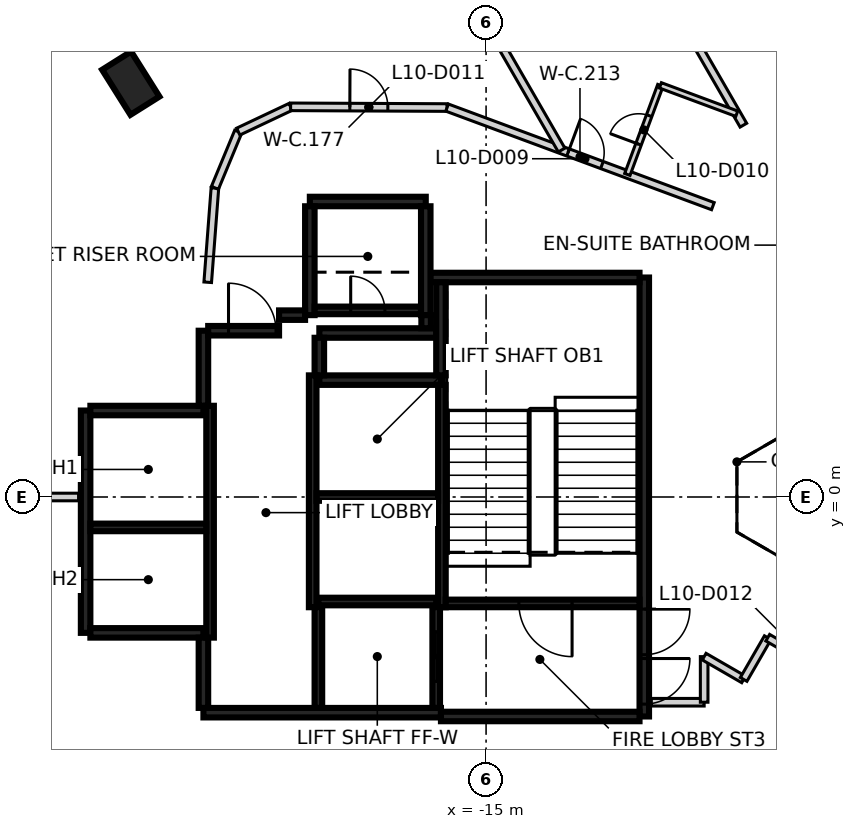
"""IFC4 building model, lengths in metres.
Left out: names, types, materials, properties, quantities, classifications, styles, units other than length and angle.
Written with IfcOpenShell. Run it as: python <this file> out.ifc"""

import sys

from ifc_helpers import new_model, si_unit, direction, frame, frame_2d, origin, origin_2d, place, context, subcontext, project, spatial, rectangle, extrude, element, fill, save


model = new_model("IFC4")
c1 = context("Model", 3, precision=1e-05, world=origin(), true_north=direction((0.0, 1.0)))
c2 = subcontext(c1, "Body", "Model", "MODEL_VIEW")
j1 = project(units=[si_unit("LENGTHUNIT", "METRE"), si_unit("PLANEANGLEUNIT", "RADIAN")], contexts=[c1])
p1 = place(None, origin())
s1 = spatial("IfcSite", under=j1, at=p1, CompositionType="ELEMENT")
p2 = place(p1, origin())
s2 = spatial("IfcBuilding", under=s1, at=p2, CompositionType="ELEMENT")
p3 = place(p2, frame((0.0, 0.0, 49.4)))
s3 = spatial("IfcBuildingStorey", under=s2, at=p3, CompositionType="ELEMENT", Elevation=49.4)
p4 = place(p3, frame((-24.349, 10.888, -0.475), z_axis=(0.0, 0.0, 1.0), x_axis=(-0.532388815436, 0.84649994046, 0.0)))
e1 = element("IfcColumn", 1, at=p4, inside=s3, PredefinedType="COLUMN", context=c2, shape_type="SweptSolid", body=[
    extrude(rectangle(XDim=1.4, YDim=0.9, at=origin_2d()), origin(), (0.0, 0.0, 1.0), 3.6),
])
p5 = place(p3, frame((-10.837, 5.775, 0.0), z_axis=(0.0, 0.0, 1.0), x_axis=(0.0, -1.0, 0.0)))
e2 = element("IfcWall", 2, at=p5, inside=s3, PredefinedType="SHEAR", context=c2, shape_type="SweptSolid", body=[
    extrude(rectangle(XDim=11.55, YDim=0.25, at=frame_2d((5.775, 0.0))), origin(), (0.0, 0.0, 1.0), 3.125),
])
p6 = place(p5, frame((10.025, 0.0, 0.0)))
e3 = element("IfcOpeningElement", 3, at=p6, cuts=e2, PredefinedType="OPENING", context=c2, shape_type="SweptSolid", body=[
    extrude(rectangle(XDim=1.2, YDim=2.1, at=frame_2d((0.6, 1.05))), frame((0.0, 0.135, 0.0), z_axis=(0.0, -1.0, 0.0), x_axis=(1.0, 0.0, 0.0)), (0.0, 0.0, 1.0), 0.27),
])
p7 = place(p5, frame((8.725, 0.0, 0.0)))
e4 = element("IfcOpeningElement", 4, at=p7, cuts=e2, PredefinedType="OPENING", context=c2, shape_type="SweptSolid", body=[
    extrude(rectangle(XDim=1.2, YDim=2.1, at=frame_2d((0.6, 1.05))), frame((0.0, 0.135, 0.0), z_axis=(0.0, -1.0, 0.0), x_axis=(1.0, 0.0, 0.0)), (0.0, 0.0, 1.0), 0.27),
])
p8 = place(p3, frame((-16.187, -5.675, 0.0), z_axis=(0.0, 0.0, 1.0), x_axis=(-1.0, 0.0, 0.0)))
e5 = element("IfcWall", 5, at=p8, inside=s3, PredefinedType="SHEAR", context=c2, shape_type="SweptSolid", body=[
    extrude(rectangle(XDim=6.25, YDim=0.25, at=frame_2d((3.125, 0.0))), origin(), (0.0, 0.0, 1.0), 3.125),
])
p9 = place(p3, frame((-25.537, -3.575, 0.0), z_axis=(0.0, 0.0, 1.0), x_axis=(0.0, 1.0, 0.0)))
e6 = element("IfcWall", 6, at=p9, inside=s3, PredefinedType="SHEAR", context=c2, shape_type="SweptSolid", body=[
    extrude(rectangle(XDim=5.85, YDim=0.25, at=frame_2d((2.925, 0.0))), origin(), (0.0, 0.0, 1.0), 3.125),
])
p10 = place(p3, frame((-10.963, -5.775, 0.0), z_axis=(0.0, 0.0, 1.0), x_axis=(-1.0, 0.0, 0.0)))
e7 = element("IfcWall", 7, at=p10, inside=s3, PredefinedType="SHEAR", context=c2, shape_type="SweptSolid", body=[
    extrude(rectangle(XDim=5.225, YDim=0.25, at=frame_2d((2.612, 0.0))), origin(), (0.0, 0.0, 1.0), 3.125),
])
p11 = place(p3, frame((-16.472, 5.775, 0.0), z_axis=(0.0, 0.0, 1.0), x_axis=(1.0, 0.0, 0.0)))
e8 = element("IfcWall", 8, at=p11, inside=s3, PredefinedType="SHEAR", context=c2, shape_type="SweptSolid", body=[
    extrude(rectangle(XDim=5.51, YDim=0.25, at=frame_2d((2.755, 0.0))), origin(), (0.0, 0.0, 1.0), 3.125),
])
p12 = place(p3, frame((-19.387, 3.075, 0.0), z_axis=(0.0, 0.0, 1.0), x_axis=(1.0, 0.0, 0.0)))
e9 = element("IfcWall", 9, at=p12, inside=s3, PredefinedType="SHEAR", context=c2, shape_type="SweptSolid", body=[
    extrude(rectangle(XDim=3.2, YDim=0.25, at=frame_2d((1.6, 0.0))), origin(), (0.0, 0.0, 1.0), 3.125),
])
for number, where, z_axis, x_axis in (
    (10, (-22.437, -3.575, 0.0), (0.0, 0.0, 1.0), (-1.0, 0.0, 0.0)),
    (11, (-25.412, 2.275, 0.0), (0.0, 0.0, 1.0), (1.0, 0.0, 0.0)),
):
    element("IfcWall", number, at=place(p3, frame(where, z_axis=z_axis, x_axis=x_axis)), inside=s3, PredefinedType="SHEAR", context=c2, shape_type="SweptSolid", body=[
        extrude(rectangle(XDim=2.975, YDim=0.25, at=frame_2d((1.487, 0.0))), origin(), (0.0, 0.0, 1.0), 3.125),
    ])
p13 = place(p3, frame((-19.637, 7.775, 0.0), z_axis=(0.0, 0.0, 1.0), x_axis=(1.0, 0.0, 0.0)))
e12 = element("IfcWall", 12, at=p13, inside=s3, PredefinedType="SHEAR", context=c2, shape_type="SweptSolid", body=[
    extrude(rectangle(XDim=3.05, YDim=0.25, at=frame_2d((1.525, 0.0))), origin(), (0.0, 0.0, 1.0), 3.125),
])
for number, where, z_axis, x_axis in (
    (13, (-16.587, 7.65, 0.0), (0.0, 0.0, 1.0), (0.0, -1.0, 0.0)),
    (14, (-19.637, 4.785, 0.0), (0.0, 0.0, 1.0), (0.0, 1.0, 0.0)),
):
    element("IfcWall", number, at=place(p3, frame(where, z_axis=z_axis, x_axis=x_axis)), inside=s3, PredefinedType="SHEAR", context=c2, shape_type="SweptSolid", body=[
        extrude(rectangle(XDim=2.865, YDim=0.25, at=frame_2d((1.432, 0.0))), origin(), (0.0, 0.0, 1.0), 3.125),
    ])
p14 = place(p3, frame((-16.302, 4.315, 0.0), z_axis=(0.0, 0.0, 1.0), x_axis=(-1.0, 0.0, 0.0)))
e15 = element("IfcWall", 15, at=p14, inside=s3, PredefinedType="SHEAR", context=c2, shape_type="SweptSolid", body=[
    extrude(rectangle(XDim=3.085, YDim=0.25, at=frame_2d((1.542, 0.0))), origin(), (0.0, 0.0, 1.0), 3.125),
])
p15 = place(p3, frame((-16.187, 3.2, 0.0), z_axis=(0.0, 0.0, 1.0), x_axis=(0.0, 1.0, 0.0)))
e16 = element("IfcWall", 16, at=p15, inside=s3, PredefinedType="SHEAR", context=c2, shape_type="SweptSolid", body=[
    extrude(rectangle(XDim=2.449, YDim=0.25, at=frame_2d((1.225, 0.0))), origin(), (0.0, 0.0, 1.0), 3.125),
])
p16 = place(p3, frame((-22.437, 2.4, 0.0), z_axis=(0.0, 0.0, 1.0), x_axis=(0.0, 1.0, 0.0)))
e17 = element("IfcWall", 17, at=p16, inside=s3, PredefinedType="SHEAR", context=c2, shape_type="SweptSolid", body=[
    extrude(rectangle(XDim=1.975, YDim=0.25, at=frame_2d((0.987, 0.0))), origin(), (0.0, 0.0, 1.0), 3.125),
])
p17 = place(p3, frame((-22.437, -5.55, 0.0), z_axis=(0.0, 0.0, 1.0), x_axis=(0.0, 1.0, 0.0)))
e18 = element("IfcWall", 18, at=p17, inside=s3, PredefinedType="SHEAR", context=c2, shape_type="SweptSolid", body=[
    extrude(rectangle(XDim=1.849, YDim=0.25, at=frame_2d((0.925, 0.0))), origin(), (0.0, 0.0, 1.0), 3.125),
])
p18 = place(p3, frame((-22.312, 4.375, 0.0), z_axis=(0.0, 0.0, 1.0), x_axis=(1.0, 0.0, 0.0)))
e19 = element("IfcWall", 19, at=p18, inside=s3, PredefinedType="SHEAR", context=c2, shape_type="SweptSolid", body=[
    extrude(rectangle(XDim=1.865, YDim=0.25, at=frame_2d((0.932, 0.0))), origin(), (0.0, 0.0, 1.0), 3.125),
])
p19 = place(p18, frame((0.535, 0.0, 0.0)))
e20 = element("IfcOpeningElement", 20, at=p19, cuts=e19, PredefinedType="OPENING", context=c2, shape_type="SweptSolid", body=[
    extrude(rectangle(XDim=1.25, YDim=2.1, at=frame_2d((0.625, 1.05))), frame((0.0, 0.135, 0.0), z_axis=(0.0, -1.0, 0.0), x_axis=(1.0, 0.0, 0.0)), (0.0, 0.0, 1.0), 0.27),
])
p20 = place(p3, frame((-19.387, 4.19, 0.0), z_axis=(0.0, 0.0, 1.0), x_axis=(0.0, -1.0, 0.0)))
e21 = element("IfcWall", 21, at=p20, inside=s3, PredefinedType="SHEAR", context=c2, shape_type="SweptSolid", body=[
    extrude(rectangle(XDim=0.989, YDim=0.25, at=frame_2d((0.495, 0.0))), origin(), (0.0, 0.0, 1.0), 3.125),
])
p21 = place(p3, frame((-20.447, 4.785, 0.0), z_axis=(0.0, 0.0, 1.0), x_axis=(1.0, 0.0, 0.0)))
e22 = element("IfcWall", 22, at=p21, inside=s3, PredefinedType="SHEAR", context=c2, shape_type="SweptSolid", body=[
    extrude(rectangle(XDim=0.685, YDim=0.25, at=frame_2d((0.342, 0.0))), origin(), (0.0, 0.0, 1.0), 3.125),
])
p22 = place(p3, frame((-16.577, 4.785, 0.0), z_axis=(0.0, 0.0, 1.0), x_axis=(0.0, -1.0, 0.0)))
e23 = element("IfcWall", 23, at=p22, inside=s3, PredefinedType="SHEAR", context=c2, shape_type="SweptSolid", body=[
    extrude(rectangle(XDim=0.344, YDim=0.25, at=frame_2d((0.172, 0.0))), origin(), (0.0, 0.0, 1.0), 3.125),
])
p23 = place(p3, frame((-16.162, 2.951, 0.0), z_axis=(0.0, 0.0, 1.0), x_axis=(0.0, -1.0, 0.0)))
e24 = element("IfcWall", 24, at=p23, inside=s3, PredefinedType="SHEAR", context=c2, shape_type="SweptSolid", body=[
    extrude(rectangle(XDim=5.851, YDim=0.2, at=frame_2d((2.925, 0.0))), origin(), (0.0, 0.0, 1.0), 3.125),
])
for number, where, z_axis, x_axis in (
    (25, (-19.562, -2.9, 0.0), (0.0, 0.0, 1.0), (0.0, 1.0, 0.0)),
    (26, (-22.262, 2.4, 0.0), (0.0, 0.0, 1.0), (0.0, -1.0, 0.0)),
):
    element("IfcWall", number, at=place(p3, frame(where, z_axis=z_axis, x_axis=x_axis)), inside=s3, PredefinedType="SHEAR", context=c2, shape_type="SweptSolid", body=[
        extrude(rectangle(XDim=6.1, YDim=0.2, at=frame_2d((3.05, 0.0))), origin(), (0.0, 0.0, 1.0), 3.125),
    ])
p24 = place(p3, frame((-10.963, -2.8, 0.0), z_axis=(0.0, 0.0, 1.0), x_axis=(-1.0, 0.0, 0.0)))
e27 = element("IfcWall", 27, at=p24, inside=s3, PredefinedType="SHEAR", context=c2, shape_type="SweptSolid", body=[
    extrude(rectangle(XDim=5.098, YDim=0.2, at=frame_2d((2.549, 0.0))), origin(), (0.0, 0.0, 1.0), 3.125),
])
p25 = place(p24, frame((1.774, 0.0, 0.0)))
e28 = element("IfcOpeningElement", 28, at=p25, cuts=e27, PredefinedType="OPENING", context=c2, shape_type="SweptSolid", body=[
    extrude(rectangle(XDim=1.4, YDim=2.1, at=frame_2d((0.7, 1.05))), frame((0.0, 0.11, 0.0), z_axis=(0.0, -1.0, 0.0), x_axis=(1.0, 0.0, 0.0)), (0.0, 0.0, 1.0), 0.22),
])
p26 = place(p3, frame((-16.263, 0.0, 0.0), z_axis=(0.0, 0.0, 1.0), x_axis=(-1.0, 0.0, 0.0)))
e29 = element("IfcWall", 29, at=p26, inside=s3, PredefinedType="SHEAR", context=c2, shape_type="SweptSolid", body=[
    extrude(rectangle(XDim=3.198, YDim=0.2, at=frame_2d((1.599, 0.0))), origin(), (0.0, 0.0, 1.0), 3.125),
])
p27 = place(p3, frame((-22.363, -0.8, 0.0), z_axis=(0.0, 0.0, 1.0), x_axis=(-1.0, 0.0, 0.0)))
e30 = element("IfcWall", 30, at=p27, inside=s3, PredefinedType="SHEAR", context=c2, shape_type="SweptSolid", body=[
    extrude(rectangle(XDim=3.048, YDim=0.2, at=frame_2d((1.524, 0.0))), origin(), (0.0, 0.0, 1.0), 3.125),
])
p28 = place(p3, frame((-19.511, 4.91, 0.0), z_axis=(0.0, 0.0, 1.0), x_axis=(1.0, 0.0, 0.0)))
e31 = element("IfcWall", 31, at=p28, inside=s3, PredefinedType="SHEAR", context=c2, shape_type="SweptSolid", body=[
    extrude(rectangle(XDim=2.798, YDim=0.2, at=frame_2d((1.399, 0.0))), origin(), (0.0, 0.0, 1.0), 3.125),
])
p29 = place(p28, frame((0.949, 0.0, 0.0)))
e32 = element("IfcOpeningElement", 32, at=p29, cuts=e31, PredefinedType="OPENING", context=c2, shape_type="SweptSolid", body=[
    extrude(rectangle(XDim=0.9, YDim=2.1, at=frame_2d((0.45, 1.05))), frame((0.0, 0.11, 0.0), z_axis=(0.0, -1.0, 0.0), x_axis=(1.0, 0.0, 0.0)), (0.0, 0.0, 1.0), 0.22),
])
p30 = place(p3, frame((-19.412, -2.75, 0.0), z_axis=(0.0, 0.0, 1.0), x_axis=(1.0, 0.0, 0.0)))
e33 = element("IfcWall", 33, at=p30, inside=s3, PredefinedType="SHEAR", context=c2, shape_type="SweptSolid", body=[
    extrude(rectangle(XDim=3.1, YDim=0.2, at=frame_2d((1.55, 0.0))), origin(), (0.0, 0.0, 1.0), 3.125),
])
p31 = place(p3, frame((-16.312, -2.898, 0.0), z_axis=(0.0, 0.0, 1.0), x_axis=(0.0, -1.0, 0.0)))
e34 = element("IfcWall", 34, at=p31, inside=s3, PredefinedType="SHEAR", context=c2, shape_type="SweptSolid", body=[
    extrude(rectangle(XDim=2.651, YDim=0.2, at=frame_2d((1.325, 0.0))), origin(), (0.0, 0.0, 1.0), 3.125),
])
p32 = place(p31, frame((0.652, 0.0, 0.0)))
e35 = element("IfcOpeningElement", 35, at=p32, cuts=e34, PredefinedType="OPENING", context=c2, shape_type="SweptSolid", body=[
    extrude(rectangle(XDim=1.3, YDim=2.1, at=frame_2d((0.65, 1.05))), frame((0.0, 0.11, 0.0), z_axis=(0.0, -1.0, 0.0), x_axis=(1.0, 0.0, 0.0)), (0.0, 0.0, 1.0), 0.22),
])
p33 = place(p3, frame((-19.412, -5.549, 0.0), z_axis=(0.0, 0.0, 1.0), x_axis=(0.0, 1.0, 0.0)))
e36 = element("IfcWall", 36, at=p33, inside=s3, PredefinedType="SHEAR", context=c2, shape_type="SweptSolid", body=[
    extrude(rectangle(XDim=2.651, YDim=0.2, at=frame_2d((1.325, 0.0))), origin(), (0.0, 0.0, 1.0), 3.125),
])
p34 = place(p3, frame((-22.135, 8.13, 0.0), z_axis=(0.0, 0.0, 1.0), x_axis=(-0.076073461031, -0.997102215686, 0.0)))
e37 = element("IfcWall", 37, at=p34, inside=s3, PredefinedType="PARTITIONING", context=c2, shape_type="SweptSolid", body=[
    extrude(rectangle(XDim=2.487, YDim=0.2, at=frame_2d((1.244, 0.0))), origin(), (0.0, 0.0, 1.0), 3.125),
])
p35 = place(p3, frame((-22.135, 8.134, 0.0), z_axis=(0.0, 0.0, 1.0), x_axis=(0.383208453534, 0.923661886807, 0.0)))
e38 = element("IfcWall", 38, at=p35, inside=s3, PredefinedType="PARTITIONING", context=c2, shape_type="SweptSolid", body=[
    extrude(rectangle(XDim=1.602, YDim=0.2, at=frame_2d((0.801, 0.0))), origin(), (0.0, 0.0, 1.0), 3.125),
])
p36 = place(p3, frame((-21.521, 9.614, 0.0), z_axis=(0.0, 0.0, 1.0), x_axis=(0.904083527367, 0.427355795028, 0.0)))
e39 = element("IfcWall", 39, at=p36, inside=s3, PredefinedType="PARTITIONING", context=c2, shape_type="SweptSolid", body=[
    extrude(rectangle(XDim=1.523, YDim=0.2, at=frame_2d((0.761, 0.0))), origin(), (0.0, 0.0, 1.0), 3.125),
])
p37 = place(p3, frame((-20.143, 10.266, 0.0), z_axis=(0.0, 0.0, 1.0), x_axis=(0.999989297417, -0.004626559416, 0.0)))
e40 = element("IfcWall", 40, at=p37, inside=s3, PredefinedType="PARTITIONING", context=c2, shape_type="SweptSolid", body=[
    extrude(rectangle(XDim=4.116, YDim=0.2, at=frame_2d((2.058, 0.0))), origin(), (0.0, 0.0, 1.0), 3.125),
])
p38 = place(p37, frame((1.558, 0.0, 0.0)))
e41 = element("IfcOpeningElement", 41, at=p38, cuts=e40, PredefinedType="OPENING", context=c2, shape_type="SweptSolid", body=[
    extrude(rectangle(XDim=1.0, YDim=2.1, at=frame_2d((0.5, 1.05))), frame((0.0, 0.11, 0.0), z_axis=(0.0, -1.0, 0.0), x_axis=(1.0, 0.0, 0.0)), (0.0, 0.0, 1.0), 0.22),
])
p39 = place(p3, frame((-16.026, 10.246, 0.0), z_axis=(0.0, 0.0, 1.0), x_axis=(0.937598236139, -0.347720502112, 0.0)))
e42 = element("IfcWall", 42, at=p39, inside=s3, PredefinedType="PARTITIONING", context=c2, shape_type="SweptSolid", body=[
    extrude(rectangle(XDim=7.458, YDim=0.2, at=frame_2d((3.729, 0.0))), origin(), (0.0, 0.0, 1.0), 3.125),
])
p40 = place(p39, frame((3.396, 0.0, 0.0)))
e43 = element("IfcOpeningElement", 43, at=p40, cuts=e42, PredefinedType="OPENING", context=c2, shape_type="SweptSolid", body=[
    extrude(rectangle(XDim=0.95, YDim=2.1, at=frame_2d((0.475, 1.05))), frame((0.0, 0.11, 0.0), z_axis=(0.0, -1.0, 0.0), x_axis=(1.0, 0.0, 0.0)), (0.0, 0.0, 1.0), 0.22),
])
p41 = place(p3, frame((-10.652, -5.4, 0.0), z_axis=(0.0, 0.0, 1.0), x_axis=(1.0, 0.0, 0.0)))
e44 = element("IfcWall", 44, at=p41, inside=s3, PredefinedType="PARTITIONING", context=c2, shape_type="SweptSolid", body=[
    extrude(rectangle(XDim=1.39, YDim=0.2, at=frame_2d((0.695, 0.0))), origin(), (0.0, 0.0, 1.0), 3.125),
])
for number, where, z_axis, x_axis in (
    (45, (-9.262, -5.4, 0.0), (0.0, 0.0, 1.0), (0.0, 1.0, 0.0)),
    (46, (-9.262, -4.2, 0.0), (0.0, 0.0, 1.0), (0.866, -0.5, 0.0)),
):
    element("IfcWall", number, at=place(p3, frame(where, z_axis=z_axis, x_axis=x_axis)), inside=s3, PredefinedType="PARTITIONING", context=c2, shape_type="SweptSolid", body=[
        extrude(rectangle(XDim=1.2, YDim=0.2, at=frame_2d((0.6, 0.0))), origin(), (0.0, 0.0, 1.0), 3.125),
    ])
p42 = place(p3, frame((-8.223, -4.8, 0.0), z_axis=(0.0, 0.0, 1.0), x_axis=(0.499866914522, 0.866102227088, 0.0)))
e47 = element("IfcWall", 47, at=p42, inside=s3, PredefinedType="PARTITIONING", context=c2, shape_type="SweptSolid", body=[
    extrude(rectangle(XDim=1.268, YDim=0.2, at=frame_2d((0.634, 0.0))), origin(), (0.0, 0.0, 1.0), 3.125),
])
p43 = place(p3, frame((-7.589, -3.702, 0.0), z_axis=(0.0, 0.0, 1.0), x_axis=(0.865994210678, -0.500054024153, 0.0)))
e48 = element("IfcWall", 48, at=p43, inside=s3, PredefinedType="PARTITIONING", context=c2, shape_type="SweptSolid", body=[
    extrude(rectangle(XDim=6.969, YDim=0.2, at=frame_2d((3.484, 0.0))), origin(), (0.0, 0.0, 1.0), 3.125),
])
p44 = place(p43, frame((0.749, 0.0, 0.0)))
e49 = element("IfcOpeningElement", 49, at=p44, cuts=e48, PredefinedType="OPENING", context=c2, shape_type="SweptSolid", body=[
    extrude(rectangle(XDim=1.0, YDim=2.1, at=frame_2d((0.5, 1.05))), frame((0.0, 0.11, 0.0), z_axis=(0.0, -1.0, 0.0), x_axis=(1.0, 0.0, 0.0)), (0.0, 0.0, 1.0), 0.22),
])
p45 = place(p43, frame((2.674, 0.0, 0.0)))
e50 = element("IfcOpeningElement", 50, at=p45, cuts=e48, PredefinedType="OPENING", context=c2, shape_type="SweptSolid", body=[
    extrude(rectangle(XDim=0.95, YDim=2.1, at=frame_2d((0.475, 1.05))), frame((0.0, 0.11, 0.0), z_axis=(0.0, -1.0, 0.0), x_axis=(1.0, 0.0, 0.0)), (0.0, 0.0, 1.0), 0.22),
])
p46 = place(p3, frame((-33.478, 0.0, 0.0), z_axis=(0.0, 0.0, 1.0), x_axis=(1.0, 0.0, 0.0)))
e51 = element("IfcWall", 51, at=p46, inside=s3, PredefinedType="PARTITIONING", context=c2, shape_type="SweptSolid", body=[
    extrude(rectangle(XDim=7.756, YDim=0.2, at=frame_2d((3.878, 0.0))), origin(), (0.0, 0.0, 1.0), 3.125),
])
p47 = place(p3, frame((-17.996, 17.758, 0.0), z_axis=(0.0, 0.0, 1.0), x_axis=(0.500046945013, -0.865998298372, 0.0)))
e52 = element("IfcWall", 52, at=p47, inside=s3, PredefinedType="PARTITIONING", context=c2, shape_type="SweptSolid", body=[
    extrude(rectangle(XDim=9.964, YDim=0.2, at=frame_2d((4.982, 0.0))), origin(), (0.0, 0.0, 1.0), 3.125),
])
p48 = place(p3, frame((-14.149, 20.035, 0.0), z_axis=(0.0, 0.0, 1.0), x_axis=(0.500022967158, -0.866012143284, 0.0)))
e53 = element("IfcWall", 53, at=p48, inside=s3, PredefinedType="PARTITIONING", context=c2, shape_type="SweptSolid", body=[
    extrude(rectangle(XDim=11.838, YDim=0.2, at=frame_2d((5.919, 0.0))), origin(), (0.0, 0.0, 1.0), 3.125),
])
p49 = place(p3, frame((-14.148, -20.035, 0.0), z_axis=(0.0, 0.0, 1.0), x_axis=(0.499978771293, 0.866037659837, 0.0)))
e54 = element("IfcWall", 54, at=p49, inside=s3, PredefinedType="PARTITIONING", context=c2, shape_type="SweptSolid", body=[
    extrude(rectangle(XDim=17.425, YDim=0.2, at=frame_2d((8.712, 0.0))), origin(), (0.0, 0.0, 1.0), 3.125),
])
p50 = place(p3, frame((-10.276, 22.271, 0.0), z_axis=(0.0, 0.0, 1.0), x_axis=(0.499958184216, -0.866049544793, 0.0)))
e55 = element("IfcWall", 55, at=p50, inside=s3, PredefinedType="PARTITIONING", context=c2, shape_type="SweptSolid", body=[
    extrude(rectangle(XDim=17.422, YDim=0.2, at=frame_2d((8.711, 0.0))), origin(), (0.0, 0.0, 1.0), 3.125),
])
p51 = place(p3, frame((-11.283, 8.487, 0.0), z_axis=(0.0, 0.0, 1.0), x_axis=(0.347921729873, 0.937523583641, 0.0)))
e56 = element("IfcWall", 56, at=p51, inside=s3, PredefinedType="PARTITIONING", context=c2, shape_type="SweptSolid", body=[
    extrude(rectangle(XDim=2.5, YDim=0.15, at=frame_2d((1.25, 0.0))), origin(), (0.0, 0.0, 1.0), 3.125),
])
p52 = place(p51, frame((0.85, 0.0, 0.0)))
e57 = element("IfcOpeningElement", 57, at=p52, cuts=e56, PredefinedType="OPENING", context=c2, shape_type="SweptSolid", body=[
    extrude(rectangle(XDim=0.8, YDim=2.1, at=frame_2d((0.4, 1.05))), frame((0.0, 0.085, 0.0), z_axis=(0.0, -1.0, 0.0), x_axis=(1.0, 0.0, 0.0)), (0.0, 0.0, 1.0), 0.17),
])
p53 = place(p3, frame((-10.413, 10.831, 0.0), z_axis=(0.0, 0.0, 1.0), x_axis=(0.937443331153, -0.348137904971, 0.0)))
e58 = element("IfcWall", 58, at=p53, inside=s3, PredefinedType="PARTITIONING", context=c2, shape_type="SweptSolid", body=[
    extrude(rectangle(XDim=2.143, YDim=0.15, at=frame_2d((1.072, 0.0))), origin(), (0.0, 0.0, 1.0), 3.125),
])
p54 = place(p32, origin())
e59 = element("IfcDoor", 59, at=p54, inside=s3, OperationType="SLIDING_TO_RIGHT", PredefinedType="DOOR", context=c2, shape_type="SweptSolid", body=[
    extrude(rectangle(XDim=1.3, YDim=2.1, at=frame_2d((0.65, 1.05))), frame((0.0, 0.025, 0.0), z_axis=(0.0, -1.0, 0.0), x_axis=(1.0, 0.0, 0.0)), (0.0, 0.0, 1.0), 0.05),
])
fill(e35, e59)
p55 = place(p19, origin())
e60 = element("IfcDoor", 60, at=p55, inside=s3, OperationType="SINGLE_SWING_LEFT", PredefinedType="DOOR", context=c2, shape_type="SweptSolid", body=[
    extrude(rectangle(XDim=1.25, YDim=2.1, at=frame_2d((0.625, 1.05))), frame((0.0, 0.025, 0.0), z_axis=(0.0, -1.0, 0.0), x_axis=(1.0, 0.0, 0.0)), (0.0, 0.0, 1.0), 0.05),
])
fill(e20, e60)
p56 = place(p6, origin())
e61 = element("IfcDoor", 61, at=p56, inside=s3, OperationType="SINGLE_SWING_LEFT", PredefinedType="DOOR", context=c2, shape_type="SweptSolid", body=[
    extrude(rectangle(XDim=1.2, YDim=2.1, at=frame_2d((0.6, 1.05))), frame((0.0, 0.025, 0.0), z_axis=(0.0, -1.0, 0.0), x_axis=(1.0, 0.0, 0.0)), (0.0, 0.0, 1.0), 0.05),
])
fill(e3, e61)
p57 = place(p7, origin())
e62 = element("IfcDoor", 62, at=p57, inside=s3, OperationType="SINGLE_SWING_RIGHT", PredefinedType="DOOR", context=c2, shape_type="SweptSolid", body=[
    extrude(rectangle(XDim=1.2, YDim=2.1, at=frame_2d((0.6, 1.05))), frame((0.0, 0.025, 0.0), z_axis=(0.0, -1.0, 0.0), x_axis=(1.0, 0.0, 0.0)), (0.0, 0.0, 1.0), 0.05),
])
fill(e4, e62)
p58 = place(p25, origin())
e63 = element("IfcDoor", 63, at=p58, inside=s3, OperationType="SINGLE_SWING_RIGHT", PredefinedType="DOOR", context=c2, shape_type="SweptSolid", body=[
    extrude(rectangle(XDim=1.4, YDim=2.1, at=frame_2d((0.7, 1.05))), frame((0.0, 0.025, 0.0), z_axis=(0.0, -1.0, 0.0), x_axis=(1.0, 0.0, 0.0)), (0.0, 0.0, 1.0), 0.05),
])
fill(e28, e63)
p59 = place(p29, origin())
e64 = element("IfcDoor", 64, at=p59, inside=s3, OperationType="SINGLE_SWING_LEFT", PredefinedType="DOOR", context=c2, shape_type="SweptSolid", body=[
    extrude(rectangle(XDim=0.9, YDim=2.1, at=frame_2d((0.45, 1.05))), frame((0.0, 0.025, 0.0), z_axis=(0.0, -1.0, 0.0), x_axis=(1.0, 0.0, 0.0)), (0.0, 0.0, 1.0), 0.05),
])
fill(e32, e64)
p60 = place(p40, origin())
e65 = element("IfcDoor", 65, at=p60, inside=s3, OperationType="SINGLE_SWING_LEFT", PredefinedType="DOOR", context=c2, shape_type="SweptSolid", body=[
    extrude(rectangle(XDim=0.95, YDim=2.1, at=frame_2d((0.475, 1.05))), frame((0.0, 0.025, 0.0), z_axis=(0.0, -1.0, 0.0), x_axis=(1.0, 0.0, 0.0)), (0.0, 0.0, 1.0), 0.05),
])
fill(e43, e65)
p61 = place(p52, origin())
e66 = element("IfcDoor", 66, at=p61, inside=s3, OperationType="SINGLE_SWING_LEFT", PredefinedType="DOOR", context=c2, shape_type="SweptSolid", body=[
    extrude(rectangle(XDim=0.8, YDim=2.1, at=frame_2d((0.4, 1.05))), frame((0.0, 0.025, 0.0), z_axis=(0.0, -1.0, 0.0), x_axis=(1.0, 0.0, 0.0)), (0.0, 0.0, 1.0), 0.05),
])
fill(e57, e66)
p62 = place(p38, frame((1.0, 0.0, 0.0), z_axis=(0.0, 0.0, 1.0), x_axis=(-1.0, 0.0, 0.0)))
e67 = element("IfcDoor", 67, at=p62, inside=s3, OperationType="SINGLE_SWING_LEFT", PredefinedType="DOOR", context=c2, shape_type="SweptSolid", body=[
    extrude(rectangle(XDim=1.0, YDim=2.1, at=frame_2d((0.5, 1.05))), frame((0.0, 0.025, 0.0), z_axis=(0.0, -1.0, 0.0), x_axis=(1.0, 0.0, 0.0)), (0.0, 0.0, 1.0), 0.05),
])
fill(e41, e67)
save(model, sys.argv[1])
